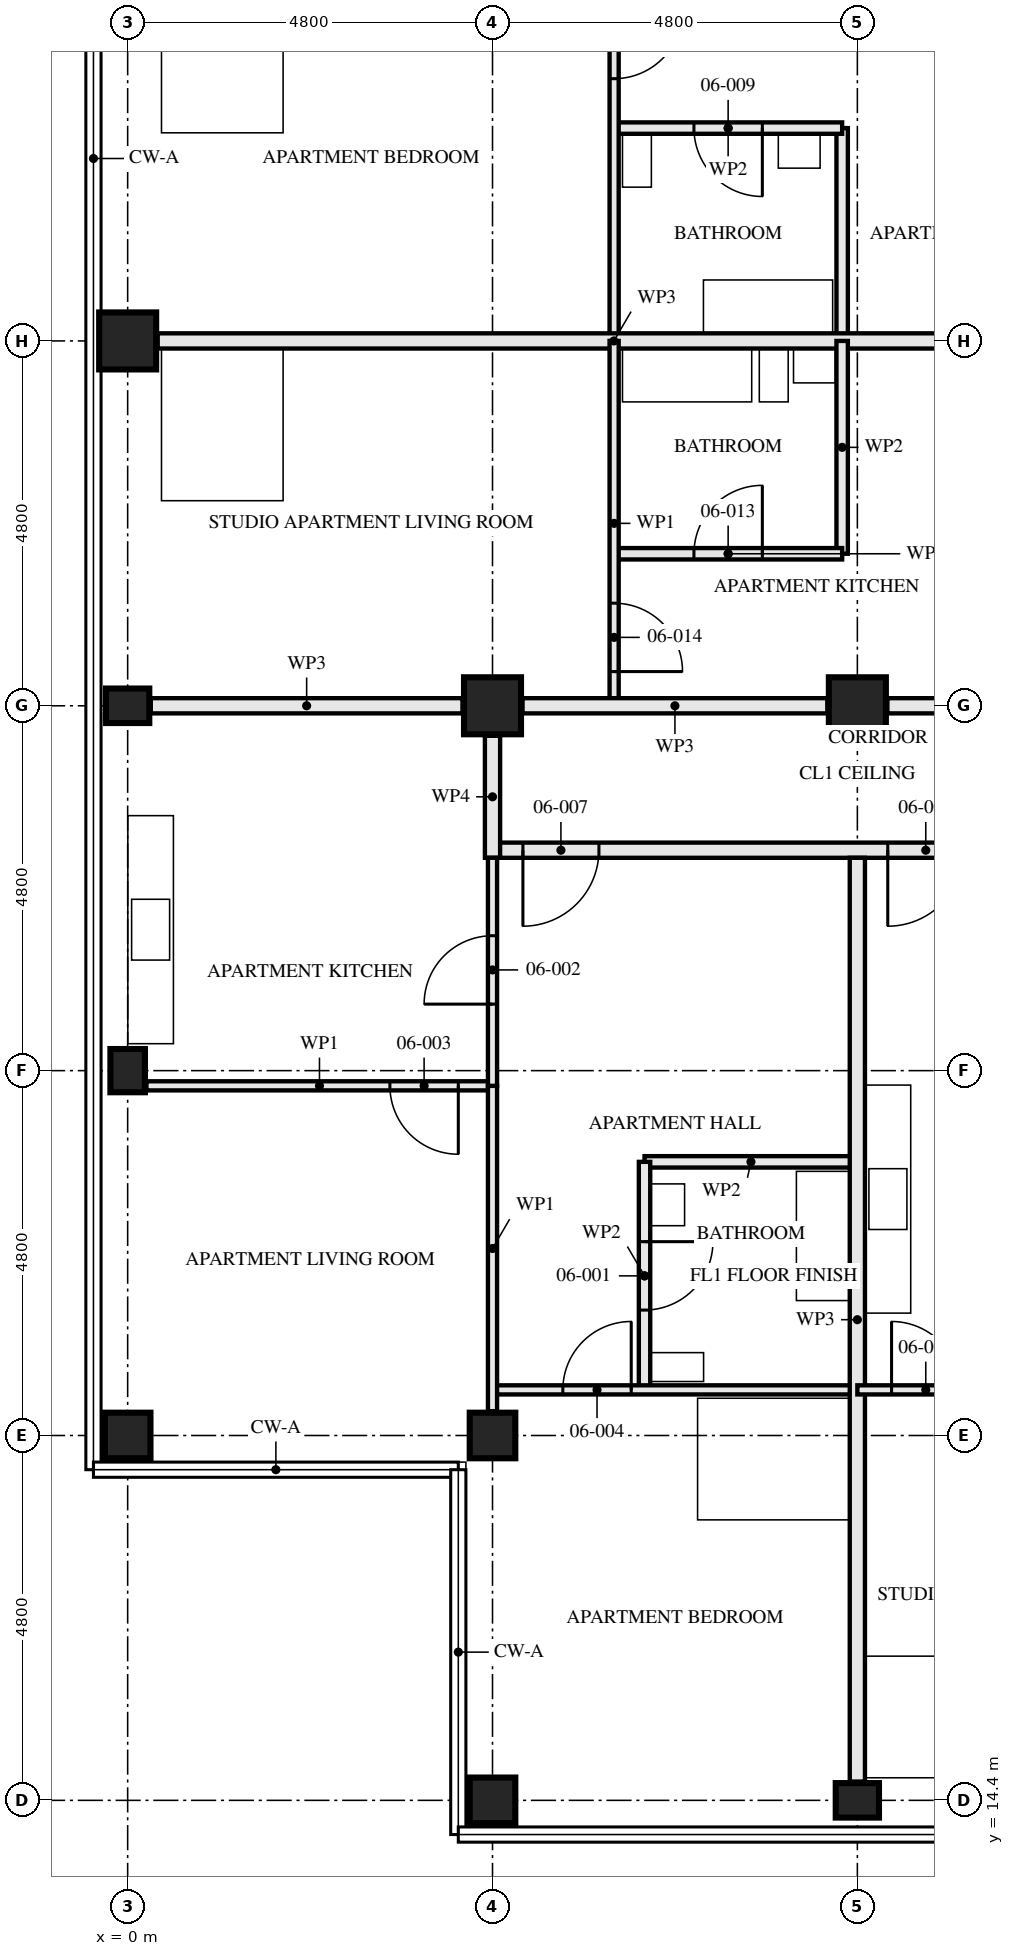
"""IFC4 building model, lengths in metres.
Left out: names, types, materials, properties, quantities, classifications, styles, units other than length and angle.
Written with IfcOpenShell. Run it as: python <this file> out.ifc"""

import sys

from ifc_helpers import new_model, si_unit, direction, frame, frame_2d, origin, origin_2d, place, context, subcontext, project, spatial, rectangle, hollow_rectangle, i_section, extrude, element, fill, save


model = new_model("IFC4")
c1 = context("Model", 3, precision=1e-05, world=origin(), true_north=direction((0.0, 1.0)))
c2 = subcontext(c1, "Body", "Model", "MODEL_VIEW")
j1 = project(units=[si_unit("LENGTHUNIT", "METRE"), si_unit("PLANEANGLEUNIT", "RADIAN")], contexts=[c1])
p1 = place(None, origin())
s1 = spatial("IfcSite", under=j1, at=p1, CompositionType="ELEMENT")
p2 = place(p1, origin())
s2 = spatial("IfcBuilding", under=s1, at=p2, CompositionType="ELEMENT")
p3 = place(p2, frame((0.0, 0.0, 27.0)))
s3 = spatial("IfcBuildingStorey", under=s2, at=p3, CompositionType="ELEMENT", Elevation=27.0)
p4 = place(p3, frame((0.0, 19.2, 0.0), z_axis=(0.0, 0.0, 1.0), x_axis=(0.0, 1.0, 0.0)))
e1 = element("IfcColumn", 1, at=p4, inside=s3, PredefinedType="COLUMN", context=c2, shape_type="SweptSolid", body=[
    extrude(hollow_rectangle(XDim=0.6, YDim=0.6, WallThickness=0.05, at=origin_2d()), origin(), (0.0, 0.0, 1.0), 3.5),
])
for number, where, z_axis, x_axis in (
    (2, (0.0, 24.0, 0.0), (0.0, 0.0, 1.0), (1.0, 0.0, 0.0)),
    (3, (0.0, 28.8, 0.0), (0.0, 0.0, 1.0), (0.0, 1.0, 0.0)),
):
    element("IfcColumn", number, at=place(p3, frame(where, z_axis=z_axis, x_axis=x_axis)), inside=s3, PredefinedType="COLUMN", context=c2, shape_type="SweptSolid", body=[
        extrude(i_section(OverallWidth=0.454, OverallDepth=0.569, WebThickness=0.078, FlangeThickness=0.125, FilletRadius=0.015, at=origin_2d()), origin(), (0.0, 0.0, 1.0), 3.5),
    ])
p5 = place(p3, frame((0.0, 33.6, 0.0), z_axis=(0.0, 0.0, 1.0), x_axis=(1.0, 0.0, 0.0)))
e4 = element("IfcColumn", 4, at=p5, inside=s3, PredefinedType="COLUMN", context=c2, shape_type="SweptSolid", body=[
    extrude(hollow_rectangle(XDim=0.75, YDim=0.75, WallThickness=0.08, at=origin_2d()), origin(), (0.0, 0.0, 1.0), 3.5),
])
for number, where, z_axis, x_axis in (
    (5, (4.8, 14.4, 0.0), (0.0, 0.0, 1.0), (0.0, 1.0, 0.0)),
    (6, (4.8, 19.2, 0.0), (0.0, 0.0, 1.0), (0.0, 1.0, 0.0)),
):
    element("IfcColumn", number, at=place(p3, frame(where, z_axis=z_axis, x_axis=x_axis)), inside=s3, PredefinedType="COLUMN", context=c2, shape_type="SweptSolid", body=[
        extrude(hollow_rectangle(XDim=0.6, YDim=0.6, WallThickness=0.05, at=origin_2d()), origin(), (0.0, 0.0, 1.0), 3.5),
    ])
p6 = place(p3, frame((4.8, 28.8, 0.0), z_axis=(0.0, 0.0, 1.0), x_axis=(0.0, 1.0, 0.0)))
e7 = element("IfcColumn", 7, at=p6, inside=s3, PredefinedType="COLUMN", context=c2, shape_type="SweptSolid", body=[
    extrude(hollow_rectangle(XDim=0.75, YDim=0.75, WallThickness=0.08, at=origin_2d()), origin(), (0.0, 0.0, 1.0), 3.5),
])
p7 = place(p3, frame((9.6, 14.4, 0.0), z_axis=(0.0, 0.0, 1.0), x_axis=(0.0, 1.0, 0.0)))
e8 = element("IfcColumn", 8, at=p7, inside=s3, PredefinedType="COLUMN", context=c2, shape_type="SweptSolid", body=[
    extrude(i_section(OverallWidth=0.454, OverallDepth=0.569, WebThickness=0.078, FlangeThickness=0.125, FilletRadius=0.015, at=origin_2d()), origin(), (0.0, 0.0, 1.0), 3.5),
])
p8 = place(p3, frame((9.6, 28.8, 0.0), z_axis=(0.0, 0.0, 1.0), x_axis=(0.0, 1.0, 0.0)))
e9 = element("IfcColumn", 9, at=p8, inside=s3, PredefinedType="COLUMN", context=c2, shape_type="SweptSolid", body=[
    extrude(hollow_rectangle(XDim=0.75, YDim=0.75, WallThickness=0.08, at=origin_2d()), origin(), (0.0, 0.0, 1.0), 3.5),
])
p9 = place(p3, frame((6.8, 19.8, 0.0), z_axis=(0.0, 0.0, 1.0), x_axis=(0.0, 1.0, 0.0)))
e10 = element("IfcWall", 10, at=p9, inside=s3, PredefinedType="PARTITIONING", context=c2, shape_type="SweptSolid", body=[
    extrude(rectangle(XDim=3.0, YDim=0.15, at=frame_2d((1.5, 0.0))), origin(), (0.0, 0.0, 1.0), 3.33),
])
p10 = place(p9, frame((1.05, 0.0, 0.0)))
e11 = element("IfcOpeningElement", 11, at=p10, cuts=e10, PredefinedType="OPENING", context=c2, shape_type="SweptSolid", body=[
    extrude(rectangle(XDim=0.9, YDim=2.1, at=frame_2d((0.45, 1.05))), frame((0.0, 0.085, 0.0), z_axis=(0.0, -1.0, 0.0), x_axis=(1.0, 0.0, 0.0)), (0.0, 0.0, 1.0), 0.171),
])
p11 = place(p3, frame((6.8, 22.8, 0.0), z_axis=(0.0, 0.0, 1.0), x_axis=(1.0, 0.0, 0.0)))
e12 = element("IfcWall", 12, at=p11, inside=s3, PredefinedType="PARTITIONING", context=c2, shape_type="SweptSolid", body=[
    extrude(rectangle(XDim=2.8, YDim=0.15, at=frame_2d((1.4, 0.0))), origin(), (0.0, 0.0, 1.0), 3.33),
])
p12 = place(p3, frame((4.8, 23.8, 0.0), z_axis=(0.0, 0.0, 1.0), x_axis=(0.0, 1.0, 0.0)))
e13 = element("IfcWall", 13, at=p12, inside=s3, PredefinedType="PARTITIONING", context=c2, shape_type="SweptSolid", body=[
    extrude(rectangle(XDim=3.0, YDim=0.12, at=frame_2d((1.5, 0.0))), origin(), (0.0, 0.0, 1.0), 2.55),
])
p13 = place(p12, frame((1.075, 0.0, 0.0)))
e14 = element("IfcOpeningElement", 14, at=p13, cuts=e13, PredefinedType="OPENING", context=c2, shape_type="SweptSolid", body=[
    extrude(rectangle(XDim=0.9, YDim=2.1, at=frame_2d((0.45, 1.05))), frame((0.0, 0.071, 0.0), z_axis=(0.0, -1.0, 0.0), x_axis=(1.0, 0.0, 0.0)), (0.0, 0.0, 1.0), 0.141),
])
p14 = place(p3, frame((0.247, 23.8, 0.0), z_axis=(0.0, 0.0, 1.0), x_axis=(1.0, 0.0, 0.0)))
e15 = element("IfcWall", 15, at=p14, inside=s3, PredefinedType="PARTITIONING", context=c2, shape_type="SweptSolid", body=[
    extrude(rectangle(XDim=4.553, YDim=0.12, at=frame_2d((2.276, 0.0))), origin(), (0.0, 0.0, 1.0), 3.33),
])
p15 = place(p14, frame((3.203, 0.0, 0.0)))
e16 = element("IfcOpeningElement", 16, at=p15, cuts=e15, PredefinedType="OPENING", context=c2, shape_type="SweptSolid", body=[
    extrude(rectangle(XDim=0.9, YDim=2.1, at=frame_2d((0.45, 1.05))), frame((0.0, 0.071, 0.0), z_axis=(0.0, -1.0, 0.0), x_axis=(1.0, 0.0, 0.0)), (0.0, 0.0, 1.0), 0.141),
])
p16 = place(p3, frame((4.8, 19.8, 0.0), z_axis=(0.0, 0.0, 1.0), x_axis=(1.0, 0.0, 0.0)))
e17 = element("IfcWall", 17, at=p16, inside=s3, PredefinedType="PARTITIONING", context=c2, shape_type="SweptSolid", body=[
    extrude(rectangle(XDim=4.8, YDim=0.12, at=frame_2d((2.4, 0.0))), origin(), (0.0, 0.0, 1.0), 3.33),
])
p17 = place(p16, frame((0.925, 0.0, 0.0)))
e18 = element("IfcOpeningElement", 18, at=p17, cuts=e17, PredefinedType="OPENING", context=c2, shape_type="SweptSolid", body=[
    extrude(rectangle(XDim=0.9, YDim=2.1, at=frame_2d((0.45, 1.05))), frame((0.0, 0.071, 0.0), z_axis=(0.0, -1.0, 0.0), x_axis=(1.0, 0.0, 0.0)), (0.0, 0.0, 1.0), 0.141),
])
p18 = place(p3, frame((4.8, 19.52, 0.0), z_axis=(0.0, 0.0, 1.0), x_axis=(0.0, 1.0, 0.0)))
e19 = element("IfcWall", 19, at=p18, inside=s3, PredefinedType="PARTITIONING", context=c2, shape_type="SweptSolid", body=[
    extrude(rectangle(XDim=4.28, YDim=0.12, at=frame_2d((2.14, 0.0))), origin(), (0.0, 0.0, 1.0), 3.33),
])
p19 = place(p3, frame((9.6, 14.647, 0.0), z_axis=(0.0, 0.0, 1.0), x_axis=(0.0, 1.0, 0.0)))
e20 = element("IfcWall", 20, at=p19, inside=s3, PredefinedType="PARTITIONING", context=c2, shape_type="SweptSolid", body=[
    extrude(rectangle(XDim=12.153, YDim=0.2, at=frame_2d((6.077, 0.0))), origin(), (0.0, 0.0, 1.0), 2.55),
])
p20 = place(p3, frame((9.6, 19.8, 0.0), z_axis=(0.0, 0.0, 1.0), x_axis=(1.0, 0.0, 0.0)))
e21 = element("IfcWall", 21, at=p20, inside=s3, PredefinedType="PARTITIONING", context=c2, shape_type="SweptSolid", body=[
    extrude(rectangle(XDim=4.8, YDim=0.12, at=frame_2d((2.4, 0.0))), origin(), (0.0, 0.0, 1.0), 3.33),
])
p21 = place(p20, frame((0.45, 0.0, 0.0)))
e22 = element("IfcOpeningElement", 22, at=p21, cuts=e21, PredefinedType="OPENING", context=c2, shape_type="SweptSolid", body=[
    extrude(rectangle(XDim=0.9, YDim=2.1, at=frame_2d((0.45, 1.05))), frame((0.0, 0.071, 0.0), z_axis=(0.0, -1.0, 0.0), x_axis=(1.0, 0.0, 0.0)), (0.0, 0.0, 1.0), 0.141),
])
p22 = place(p3, frame((4.8, 26.9, 0.0), z_axis=(0.0, 0.0, 1.0), x_axis=(1.0, 0.0, 0.0)))
e23 = element("IfcWall", 23, at=p22, inside=s3, PredefinedType="PARTITIONING", context=c2, shape_type="SweptSolid", body=[
    extrude(rectangle(XDim=9.6, YDim=0.2, at=frame_2d((4.8, 0.0))), origin(), (0.0, 0.0, 1.0), 3.33),
])
p23 = place(p22, frame((0.4, 0.0, 0.0)))
e24 = element("IfcOpeningElement", 24, at=p23, cuts=e23, PredefinedType="OPENING", context=c2, shape_type="SweptSolid", body=[
    extrude(rectangle(XDim=1.0, YDim=2.1, at=frame_2d((0.5, 1.05))), frame((0.0, 0.111, 0.0), z_axis=(0.0, -1.0, 0.0), x_axis=(1.0, 0.0, 0.0)), (0.0, 0.0, 1.0), 0.221),
])
p24 = place(p22, frame((5.2, 0.0, 0.0)))
e25 = element("IfcOpeningElement", 25, at=p24, cuts=e23, PredefinedType="OPENING", context=c2, shape_type="SweptSolid", body=[
    extrude(rectangle(XDim=1.0, YDim=2.1, at=frame_2d((0.5, 1.05))), frame((0.0, 0.111, 0.0), z_axis=(0.0, -1.0, 0.0), x_axis=(1.0, 0.0, 0.0)), (0.0, 0.0, 1.0), 0.221),
])
p25 = place(p3, frame((4.8, 26.8, 0.0), z_axis=(0.0, 0.0, 1.0), x_axis=(0.0, 1.0, 0.0)))
e26 = element("IfcWall", 26, at=p25, inside=s3, PredefinedType="PARTITIONING", context=c2, shape_type="SweptSolid", body=[
    extrude(rectangle(XDim=1.605, YDim=0.2, at=frame_2d((0.802, 0.0))), origin(), (0.0, 0.0, 1.0), 3.33),
])
p26 = place(p3, frame((6.4, 36.4, 0.0), z_axis=(0.0, 0.0, 1.0), x_axis=(1.0, 0.0, 0.0)))
e27 = element("IfcWall", 27, at=p26, inside=s3, PredefinedType="PARTITIONING", context=c2, shape_type="SweptSolid", body=[
    extrude(rectangle(XDim=3.0, YDim=0.15, at=frame_2d((1.5, 0.0))), origin(), (0.0, 0.0, 1.0), 3.33),
])
p27 = place(p26, frame((1.05, 0.0, 0.0)))
e28 = element("IfcOpeningElement", 28, at=p27, cuts=e27, PredefinedType="OPENING", context=c2, shape_type="SweptSolid", body=[
    extrude(rectangle(XDim=0.9, YDim=2.1, at=frame_2d((0.45, 1.05))), frame((0.0, 0.085, 0.0), z_axis=(0.0, -1.0, 0.0), x_axis=(1.0, 0.0, 0.0)), (0.0, 0.0, 1.0), 0.171),
])
p28 = place(p3, frame((9.4, 36.4, 0.0), z_axis=(0.0, 0.0, 1.0), x_axis=(0.0, -1.0, 0.0)))
e29 = element("IfcWall", 29, at=p28, inside=s3, PredefinedType="PARTITIONING", context=c2, shape_type="SweptSolid", body=[
    extrude(rectangle(XDim=2.8, YDim=0.15, at=frame_2d((1.4, 0.0))), origin(), (0.0, 0.0, 1.0), 3.33),
])
p29 = place(p3, frame((6.4, 38.4, 0.0), z_axis=(0.0, 0.0, 1.0), x_axis=(0.0, -1.0, 0.0)))
e30 = element("IfcWall", 30, at=p29, inside=s3, PredefinedType="PARTITIONING", context=c2, shape_type="SweptSolid", body=[
    extrude(rectangle(XDim=4.8, YDim=0.12, at=frame_2d((2.4, 0.0))), origin(), (0.0, 0.0, 1.0), 3.33),
])
p30 = place(p29, frame((0.45, 0.0, 0.0)))
e31 = element("IfcOpeningElement", 31, at=p30, cuts=e30, PredefinedType="OPENING", context=c2, shape_type="SweptSolid", body=[
    extrude(rectangle(XDim=0.9, YDim=2.1, at=frame_2d((0.45, 1.05))), frame((0.0, 0.071, 0.0), z_axis=(0.0, -1.0, 0.0), x_axis=(1.0, 0.0, 0.0)), (0.0, 0.0, 1.0), 0.141),
])
p31 = place(p3, frame((0.395, 33.6, 0.0), z_axis=(0.0, 0.0, 1.0), x_axis=(1.0, 0.0, 0.0)))
e32 = element("IfcWall", 32, at=p31, inside=s3, PredefinedType="PARTITIONING", context=c2, shape_type="SweptSolid", body=[
    extrude(rectangle(XDim=12.005, YDim=0.2, at=frame_2d((6.002, 0.0))), origin(), (0.0, 0.0, 1.0), 2.55),
])
p32 = place(p3, frame((6.4, 30.8, 0.0), z_axis=(0.0, 0.0, 1.0), x_axis=(1.0, 0.0, 0.0)))
e33 = element("IfcWall", 33, at=p32, inside=s3, PredefinedType="PARTITIONING", context=c2, shape_type="SweptSolid", body=[
    extrude(rectangle(XDim=3.0, YDim=0.15, at=frame_2d((1.5, 0.0))), origin(), (0.0, 0.0, 1.0), 3.33),
])
p33 = place(p32, frame((1.05, 0.0, 0.0)))
e34 = element("IfcOpeningElement", 34, at=p33, cuts=e33, PredefinedType="OPENING", context=c2, shape_type="SweptSolid", body=[
    extrude(rectangle(XDim=0.9, YDim=2.1, at=frame_2d((0.45, 1.05))), frame((0.0, 0.085, 0.0), z_axis=(0.0, -1.0, 0.0), x_axis=(1.0, 0.0, 0.0)), (0.0, 0.0, 1.0), 0.171),
])
p34 = place(p3, frame((9.4, 33.6, 0.0), z_axis=(0.0, 0.0, 1.0), x_axis=(0.0, -1.0, 0.0)))
e35 = element("IfcWall", 35, at=p34, inside=s3, PredefinedType="PARTITIONING", context=c2, shape_type="SweptSolid", body=[
    extrude(rectangle(XDim=2.8, YDim=0.15, at=frame_2d((1.4, 0.0))), origin(), (0.0, 0.0, 1.0), 3.33),
])
p35 = place(p3, frame((6.4, 33.6, 0.0), z_axis=(0.0, 0.0, 1.0), x_axis=(0.0, -1.0, 0.0)))
e36 = element("IfcWall", 36, at=p35, inside=s3, PredefinedType="PARTITIONING", context=c2, shape_type="SweptSolid", body=[
    extrude(rectangle(XDim=4.8, YDim=0.12, at=frame_2d((2.4, 0.0))), origin(), (0.0, 0.0, 1.0), 3.33),
])
p36 = place(p35, frame((3.45, 0.0, 0.0)))
e37 = element("IfcOpeningElement", 37, at=p36, cuts=e36, PredefinedType="OPENING", context=c2, shape_type="SweptSolid", body=[
    extrude(rectangle(XDim=0.9, YDim=2.1, at=frame_2d((0.45, 1.05))), frame((0.0, 0.071, 0.0), z_axis=(0.0, -1.0, 0.0), x_axis=(1.0, 0.0, 0.0)), (0.0, 0.0, 1.0), 0.141),
])
p37 = place(p3, frame((12.5, 28.8, 0.0), z_axis=(0.0, 0.0, 1.0), x_axis=(-1.0, 0.0, 0.0)))
e38 = element("IfcWall", 38, at=p37, inside=s3, PredefinedType="PARTITIONING", context=c2, shape_type="SweptSolid", body=[
    extrude(rectangle(XDim=2.505, YDim=0.2, at=frame_2d((1.252, 0.0))), origin(), (0.0, 0.0, 1.0), 2.32),
])
p38 = place(p3, frame((9.205, 28.8, 0.0), z_axis=(0.0, 0.0, 1.0), x_axis=(-1.0, 0.0, 0.0)))
e39 = element("IfcWall", 39, at=p38, inside=s3, PredefinedType="PARTITIONING", context=c2, shape_type="SweptSolid", body=[
    extrude(rectangle(XDim=4.01, YDim=0.2, at=frame_2d((2.005, 0.0))), origin(), (0.0, 0.0, 1.0), 2.32),
])
p39 = place(p3, frame((4.405, 28.8, 0.0), z_axis=(0.0, 0.0, 1.0), x_axis=(-1.0, 0.0, 0.0)))
e40 = element("IfcWall", 40, at=p39, inside=s3, PredefinedType="PARTITIONING", context=c2, shape_type="SweptSolid", body=[
    extrude(rectangle(XDim=4.101, YDim=0.2, at=frame_2d((2.05, 0.0))), origin(), (0.0, 0.0, 1.0), 2.32),
])
p40 = place(p10, frame((0.9, 0.0, 0.0), z_axis=(0.0, 0.0, 1.0), x_axis=(-1.0, 0.0, 0.0)))
e41 = element("IfcDoor", 41, at=p40, inside=s3, OperationType="SINGLE_SWING_RIGHT", PredefinedType="DOOR", context=c2, shape_type="SweptSolid", body=[
    extrude(rectangle(XDim=0.9, YDim=2.1, at=frame_2d((0.45, 1.05))), frame((0.0, 0.022, 0.0), z_axis=(0.0, -1.0, 0.0), x_axis=(1.0, 0.0, 0.0)), (0.0, 0.0, 1.0), 0.044),
])
fill(e11, e41)
p41 = place(p13, origin())
e42 = element("IfcDoor", 42, at=p41, inside=s3, OperationType="SINGLE_SWING_RIGHT", PredefinedType="DOOR", context=c2, shape_type="SweptSolid", body=[
    extrude(rectangle(XDim=0.9, YDim=2.1, at=frame_2d((0.45, 1.05))), frame((0.0, 0.022, 0.0), z_axis=(0.0, -1.0, 0.0), x_axis=(1.0, 0.0, 0.0)), (0.0, 0.0, 1.0), 0.044),
])
fill(e14, e42)
p42 = place(p15, frame((0.9, 0.0, 0.0), z_axis=(0.0, 0.0, 1.0), x_axis=(-1.0, 0.0, 0.0)))
e43 = element("IfcDoor", 43, at=p42, inside=s3, OperationType="SINGLE_SWING_RIGHT", PredefinedType="DOOR", context=c2, shape_type="SweptSolid", body=[
    extrude(rectangle(XDim=0.9, YDim=2.1, at=frame_2d((0.45, 1.05))), frame((0.0, 0.022, 0.0), z_axis=(0.0, -1.0, 0.0), x_axis=(1.0, 0.0, 0.0)), (0.0, 0.0, 1.0), 0.044),
])
fill(e16, e43)
p43 = place(p17, origin())
e44 = element("IfcDoor", 44, at=p43, inside=s3, OperationType="SINGLE_SWING_LEFT", PredefinedType="DOOR", context=c2, shape_type="SweptSolid", body=[
    extrude(rectangle(XDim=0.9, YDim=2.1, at=frame_2d((0.45, 1.05))), frame((0.0, 0.022, 0.0), z_axis=(0.0, -1.0, 0.0), x_axis=(1.0, 0.0, 0.0)), (0.0, 0.0, 1.0), 0.044),
])
fill(e18, e44)
p44 = place(p21, origin())
e45 = element("IfcDoor", 45, at=p44, inside=s3, OperationType="SINGLE_SWING_RIGHT", PredefinedType="DOOR", context=c2, shape_type="SweptSolid", body=[
    extrude(rectangle(XDim=0.9, YDim=2.1, at=frame_2d((0.45, 1.05))), frame((0.0, 0.022, 0.0), z_axis=(0.0, -1.0, 0.0), x_axis=(1.0, 0.0, 0.0)), (0.0, 0.0, 1.0), 0.044),
])
fill(e22, e45)
p45 = place(p23, frame((1.0, 0.0, 0.0), z_axis=(0.0, 0.0, 1.0), x_axis=(-1.0, 0.0, 0.0)))
e46 = element("IfcDoor", 46, at=p45, inside=s3, OperationType="SINGLE_SWING_LEFT", PredefinedType="DOOR", context=c2, shape_type="SweptSolid", body=[
    extrude(rectangle(XDim=1.0, YDim=2.1, at=frame_2d((0.5, 1.05))), frame((0.0, 0.027, 0.0), z_axis=(0.0, -1.0, 0.0), x_axis=(1.0, 0.0, 0.0)), (0.0, 0.0, 1.0), 0.054),
])
fill(e24, e46)
p46 = place(p24, frame((1.0, 0.0, 0.0), z_axis=(0.0, 0.0, 1.0), x_axis=(-1.0, 0.0, 0.0)))
e47 = element("IfcDoor", 47, at=p46, inside=s3, OperationType="SINGLE_SWING_LEFT", PredefinedType="DOOR", context=c2, shape_type="SweptSolid", body=[
    extrude(rectangle(XDim=1.0, YDim=2.1, at=frame_2d((0.5, 1.05))), frame((0.0, 0.027, 0.0), z_axis=(0.0, -1.0, 0.0), x_axis=(1.0, 0.0, 0.0)), (0.0, 0.0, 1.0), 0.054),
])
fill(e25, e47)
p47 = place(p27, frame((0.9, 0.0, 0.0), z_axis=(0.0, 0.0, 1.0), x_axis=(-1.0, 0.0, 0.0)))
e48 = element("IfcDoor", 48, at=p47, inside=s3, OperationType="SINGLE_SWING_RIGHT", PredefinedType="DOOR", context=c2, shape_type="SweptSolid", body=[
    extrude(rectangle(XDim=0.9, YDim=2.1, at=frame_2d((0.45, 1.05))), frame((0.0, 0.022, 0.0), z_axis=(0.0, -1.0, 0.0), x_axis=(1.0, 0.0, 0.0)), (0.0, 0.0, 1.0), 0.044),
])
fill(e28, e48)
p48 = place(p30, origin())
e49 = element("IfcDoor", 49, at=p48, inside=s3, OperationType="SINGLE_SWING_RIGHT", PredefinedType="DOOR", context=c2, shape_type="SweptSolid", body=[
    extrude(rectangle(XDim=0.9, YDim=2.1, at=frame_2d((0.45, 1.05))), frame((0.0, 0.022, 0.0), z_axis=(0.0, -1.0, 0.0), x_axis=(1.0, 0.0, 0.0)), (0.0, 0.0, 1.0), 0.044),
])
fill(e31, e49)
p49 = place(p33, origin())
e50 = element("IfcDoor", 50, at=p49, inside=s3, OperationType="SINGLE_SWING_LEFT", PredefinedType="DOOR", context=c2, shape_type="SweptSolid", body=[
    extrude(rectangle(XDim=0.9, YDim=2.1, at=frame_2d((0.45, 1.05))), frame((0.0, 0.022, 0.0), z_axis=(0.0, -1.0, 0.0), x_axis=(1.0, 0.0, 0.0)), (0.0, 0.0, 1.0), 0.044),
])
fill(e34, e50)
p50 = place(p36, origin())
e51 = element("IfcDoor", 51, at=p50, inside=s3, OperationType="SINGLE_SWING_LEFT", PredefinedType="DOOR", context=c2, shape_type="SweptSolid", body=[
    extrude(rectangle(XDim=0.9, YDim=2.1, at=frame_2d((0.45, 1.05))), frame((0.0, 0.022, 0.0), z_axis=(0.0, -1.0, 0.0), x_axis=(1.0, 0.0, 0.0)), (0.0, 0.0, 1.0), 0.044),
])
fill(e37, e51)
save(model, sys.argv[1])
